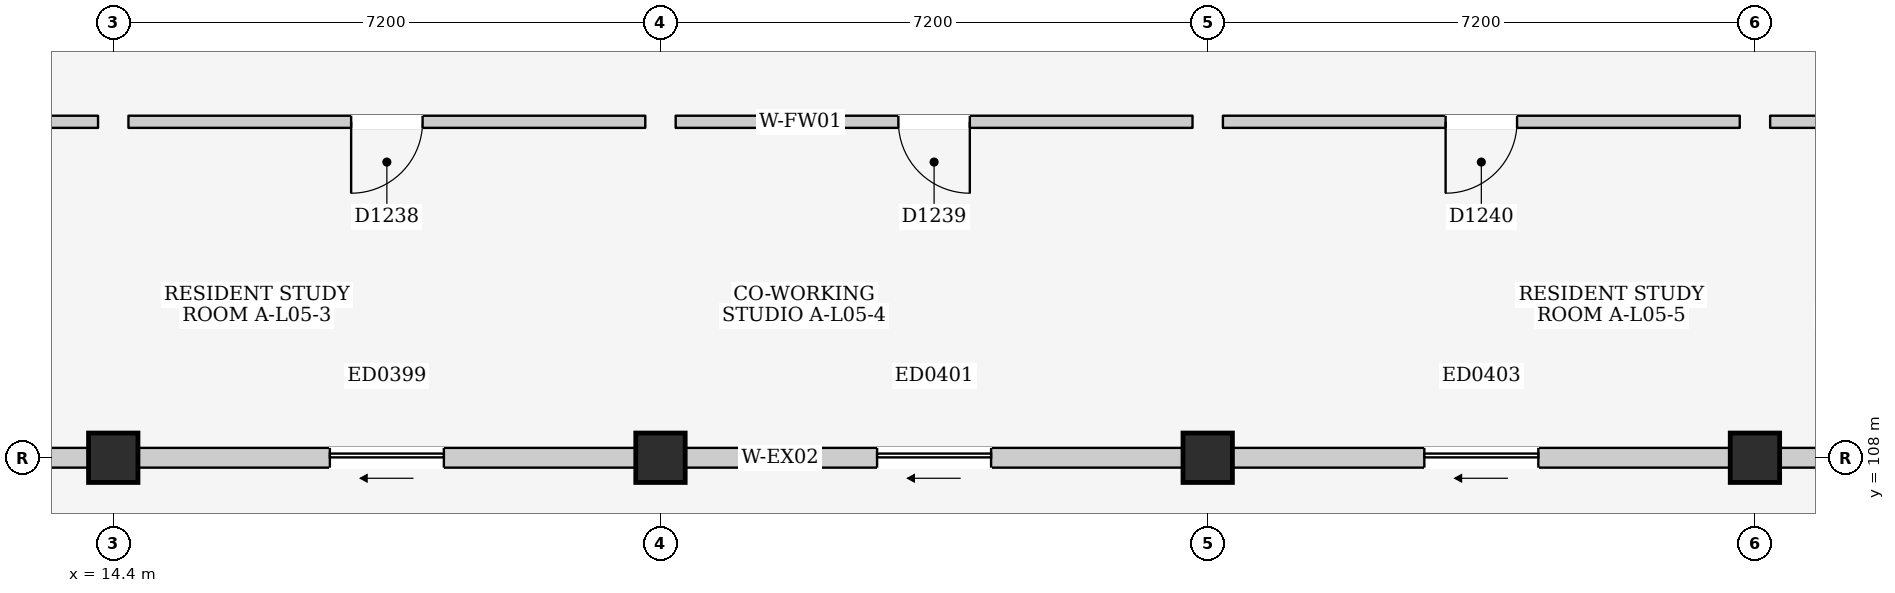
"""IFC4 building model, lengths in metres.
Left out: names, types, materials, properties, quantities, classifications, styles, units other than length and angle.
Written with IfcOpenShell. Run it as: python <this file> out.ifc"""

import sys

from ifc_helpers import new_model, si_unit, direction, frame, frame_2d, origin, origin_2d, place, context, subcontext, project, spatial, rectangle, extrude, element, fill, save


model = new_model("IFC4")
c1 = context("Model", 3, precision=1e-05, world=origin(), true_north=direction((0.0, 1.0)))
c2 = subcontext(c1, "Body", "Model", "MODEL_VIEW")
j1 = project(units=[si_unit("LENGTHUNIT", "METRE"), si_unit("PLANEANGLEUNIT", "RADIAN")], contexts=[c1])
p1 = place(None, origin())
s1 = spatial("IfcSite", under=j1, at=p1, CompositionType="ELEMENT")
p2 = place(p1, origin())
s2 = spatial("IfcBuilding", under=s1, at=p2, CompositionType="ELEMENT")
p3 = place(p2, frame((0.0, 0.0, 18.6)))
s3 = spatial("IfcBuildingStorey", under=s2, at=p3, CompositionType="ELEMENT", Elevation=18.6)
for number, where, z_axis, x_axis in (
    (1, (14.4, 108.0, 0.0), (0.0, 0.0, 1.0), (1.0, 0.0, 0.0)),
    (2, (21.6, 108.0, 0.0), (0.0, 0.0, 1.0), (1.0, 0.0, 0.0)),
    (3, (28.8, 108.0, 0.0), (0.0, 0.0, 1.0), (1.0, 0.0, 0.0)),
    (4, (36.0, 108.0, 0.0), (0.0, 0.0, 1.0), (1.0, 0.0, 0.0)),
):
    element("IfcColumn", number, at=place(p3, frame(where, z_axis=z_axis, x_axis=x_axis)), inside=s3, PredefinedType="COLUMN", context=c2, shape_type="SweptSolid", body=[
        extrude(rectangle(XDim=0.65, YDim=0.65, at=origin_2d()), origin(), (0.0, 0.0, 1.0), 3.3),
    ])
p4 = place(p3, frame((7.525, 108.0, 0.0), z_axis=(0.0, 0.0, 1.0), x_axis=(1.0, 0.0, 0.0)))
e5 = element("IfcWall", 5, at=p4, inside=s3, PredefinedType="ELEMENTEDWALL", context=c2, shape_type="SweptSolid", body=[
    extrude(rectangle(XDim=6.55, YDim=0.26, at=frame_2d((3.275, 0.0))), origin(), (0.0, 0.0, 1.0), 2.395),
])
p5 = place(p4, frame((2.525, 0.0, 0.0)))
e6 = element("IfcOpeningElement", 6, at=p5, cuts=e5, PredefinedType="OPENING", context=c2, shape_type="SweptSolid", body=[
    extrude(rectangle(XDim=1.5, YDim=2.12, at=frame_2d((0.75, 1.06))), frame((0.0, 0.145, 0.0), z_axis=(0.0, -1.0, 0.0), x_axis=(1.0, 0.0, 0.0)), (0.0, 0.0, 1.0), 0.29),
])
p6 = place(p3, frame((14.725, 108.0, 0.0), z_axis=(0.0, 0.0, 1.0), x_axis=(1.0, 0.0, 0.0)))
e7 = element("IfcWall", 7, at=p6, inside=s3, PredefinedType="ELEMENTEDWALL", context=c2, shape_type="SweptSolid", body=[
    extrude(rectangle(XDim=6.55, YDim=0.26, at=frame_2d((3.275, 0.0))), origin(), (0.0, 0.0, 1.0), 2.395),
])
p7 = place(p6, frame((2.525, 0.0, 0.0)))
e8 = element("IfcOpeningElement", 8, at=p7, cuts=e7, PredefinedType="OPENING", context=c2, shape_type="SweptSolid", body=[
    extrude(rectangle(XDim=1.5, YDim=2.12, at=frame_2d((0.75, 1.06))), frame((0.0, 0.145, 0.0), z_axis=(0.0, -1.0, 0.0), x_axis=(1.0, 0.0, 0.0)), (0.0, 0.0, 1.0), 0.29),
])
p8 = place(p3, frame((21.925, 108.0, 0.0), z_axis=(0.0, 0.0, 1.0), x_axis=(1.0, 0.0, 0.0)))
e9 = element("IfcWall", 9, at=p8, inside=s3, PredefinedType="ELEMENTEDWALL", context=c2, shape_type="SweptSolid", body=[
    extrude(rectangle(XDim=6.55, YDim=0.26, at=frame_2d((3.275, 0.0))), origin(), (0.0, 0.0, 1.0), 2.395),
])
p9 = place(p8, frame((2.525, 0.0, 0.0)))
e10 = element("IfcOpeningElement", 10, at=p9, cuts=e9, PredefinedType="OPENING", context=c2, shape_type="SweptSolid", body=[
    extrude(rectangle(XDim=1.5, YDim=2.12, at=frame_2d((0.75, 1.06))), frame((0.0, 0.145, 0.0), z_axis=(0.0, -1.0, 0.0), x_axis=(1.0, 0.0, 0.0)), (0.0, 0.0, 1.0), 0.29),
])
p10 = place(p3, frame((29.125, 108.0, 0.0), z_axis=(0.0, 0.0, 1.0), x_axis=(1.0, 0.0, 0.0)))
e11 = element("IfcWall", 11, at=p10, inside=s3, PredefinedType="ELEMENTEDWALL", context=c2, shape_type="SweptSolid", body=[
    extrude(rectangle(XDim=6.55, YDim=0.26, at=frame_2d((3.275, 0.0))), origin(), (0.0, 0.0, 1.0), 2.395),
])
p11 = place(p10, frame((2.525, 0.0, 0.0)))
e12 = element("IfcOpeningElement", 12, at=p11, cuts=e11, PredefinedType="OPENING", context=c2, shape_type="SweptSolid", body=[
    extrude(rectangle(XDim=1.5, YDim=2.12, at=frame_2d((0.75, 1.06))), frame((0.0, 0.145, 0.0), z_axis=(0.0, -1.0, 0.0), x_axis=(1.0, 0.0, 0.0)), (0.0, 0.0, 1.0), 0.29),
])
p12 = place(p3, frame((36.325, 108.0, 0.0), z_axis=(0.0, 0.0, 1.0), x_axis=(1.0, 0.0, 0.0)))
e13 = element("IfcWall", 13, at=p12, inside=s3, PredefinedType="ELEMENTEDWALL", context=c2, shape_type="SweptSolid", body=[
    extrude(rectangle(XDim=6.55, YDim=0.26, at=frame_2d((3.275, 0.0))), origin(), (0.0, 0.0, 1.0), 2.395),
])
p13 = place(p12, frame((2.525, 0.0, 0.0)))
e14 = element("IfcOpeningElement", 14, at=p13, cuts=e13, PredefinedType="OPENING", context=c2, shape_type="SweptSolid", body=[
    extrude(rectangle(XDim=1.5, YDim=2.12, at=frame_2d((0.75, 1.06))), frame((0.0, 0.145, 0.0), z_axis=(0.0, -1.0, 0.0), x_axis=(1.0, 0.0, 0.0)), (0.0, 0.0, 1.0), 0.29),
])
p14 = place(p3, frame((7.4, 112.42, 0.0), z_axis=(0.0, 0.0, 1.0), x_axis=(1.0, 0.0, 0.0)))
e15 = element("IfcWall", 15, at=p14, inside=s3, PredefinedType="PARTITIONING", context=c2, shape_type="SweptSolid", body=[
    extrude(rectangle(XDim=6.8, YDim=0.16, at=frame_2d((3.4, 0.0))), origin(), (0.0, 0.0, 1.0), 3.06),
])
p15 = place(p14, frame((2.93, 0.0, 0.0)))
e16 = element("IfcOpeningElement", 16, at=p15, cuts=e15, PredefinedType="OPENING", context=c2, shape_type="SweptSolid", body=[
    extrude(rectangle(XDim=0.94, YDim=2.12, at=frame_2d((0.47, 1.06))), frame((0.0, 0.095, 0.0), z_axis=(0.0, -1.0, 0.0), x_axis=(1.0, 0.0, 0.0)), (0.0, 0.0, 1.0), 0.19),
])
p16 = place(p3, frame((14.6, 112.42, 0.0), z_axis=(0.0, 0.0, 1.0), x_axis=(1.0, 0.0, 0.0)))
e17 = element("IfcWall", 17, at=p16, inside=s3, PredefinedType="PARTITIONING", context=c2, shape_type="SweptSolid", body=[
    extrude(rectangle(XDim=6.8, YDim=0.16, at=frame_2d((3.4, 0.0))), origin(), (0.0, 0.0, 1.0), 3.06),
])
p17 = place(p16, frame((2.93, 0.0, 0.0)))
e18 = element("IfcOpeningElement", 18, at=p17, cuts=e17, PredefinedType="OPENING", context=c2, shape_type="SweptSolid", body=[
    extrude(rectangle(XDim=0.94, YDim=2.12, at=frame_2d((0.47, 1.06))), frame((0.0, 0.095, 0.0), z_axis=(0.0, -1.0, 0.0), x_axis=(1.0, 0.0, 0.0)), (0.0, 0.0, 1.0), 0.19),
])
p18 = place(p3, frame((21.8, 112.42, 0.0), z_axis=(0.0, 0.0, 1.0), x_axis=(1.0, 0.0, 0.0)))
e19 = element("IfcWall", 19, at=p18, inside=s3, PredefinedType="PARTITIONING", context=c2, shape_type="SweptSolid", body=[
    extrude(rectangle(XDim=6.8, YDim=0.16, at=frame_2d((3.4, 0.0))), origin(), (0.0, 0.0, 1.0), 3.06),
])
p19 = place(p18, frame((2.93, 0.0, 0.0)))
e20 = element("IfcOpeningElement", 20, at=p19, cuts=e19, PredefinedType="OPENING", context=c2, shape_type="SweptSolid", body=[
    extrude(rectangle(XDim=0.94, YDim=2.12, at=frame_2d((0.47, 1.06))), frame((0.0, 0.095, 0.0), z_axis=(0.0, -1.0, 0.0), x_axis=(1.0, 0.0, 0.0)), (0.0, 0.0, 1.0), 0.19),
])
p20 = place(p3, frame((29.0, 112.42, 0.0), z_axis=(0.0, 0.0, 1.0), x_axis=(1.0, 0.0, 0.0)))
e21 = element("IfcWall", 21, at=p20, inside=s3, PredefinedType="PARTITIONING", context=c2, shape_type="SweptSolid", body=[
    extrude(rectangle(XDim=6.8, YDim=0.16, at=frame_2d((3.4, 0.0))), origin(), (0.0, 0.0, 1.0), 3.06),
])
p21 = place(p20, frame((2.93, 0.0, 0.0)))
e22 = element("IfcOpeningElement", 22, at=p21, cuts=e21, PredefinedType="OPENING", context=c2, shape_type="SweptSolid", body=[
    extrude(rectangle(XDim=0.94, YDim=2.12, at=frame_2d((0.47, 1.06))), frame((0.0, 0.095, 0.0), z_axis=(0.0, -1.0, 0.0), x_axis=(1.0, 0.0, 0.0)), (0.0, 0.0, 1.0), 0.19),
])
p22 = place(p3, frame((36.2, 112.42, 0.0), z_axis=(0.0, 0.0, 1.0), x_axis=(1.0, 0.0, 0.0)))
e23 = element("IfcWall", 23, at=p22, inside=s3, PredefinedType="PARTITIONING", context=c2, shape_type="SweptSolid", body=[
    extrude(rectangle(XDim=6.8, YDim=0.16, at=frame_2d((3.4, 0.0))), origin(), (0.0, 0.0, 1.0), 3.06),
])
p23 = place(p22, frame((2.93, 0.0, 0.0)))
e24 = element("IfcOpeningElement", 24, at=p23, cuts=e23, PredefinedType="OPENING", context=c2, shape_type="SweptSolid", body=[
    extrude(rectangle(XDim=0.94, YDim=2.12, at=frame_2d((0.47, 1.06))), frame((0.0, 0.095, 0.0), z_axis=(0.0, -1.0, 0.0), x_axis=(1.0, 0.0, 0.0)), (0.0, 0.0, 1.0), 0.19),
])
p24 = place(p7, frame((1.5, 0.0, 0.0), z_axis=(0.0, 0.0, 1.0), x_axis=(-1.0, 0.0, 0.0)))
e25 = element("IfcDoor", 25, at=p24, inside=s3, OperationType="SLIDING_TO_LEFT", PredefinedType="DOOR", context=c2, shape_type="SweptSolid", body=[
    extrude(rectangle(XDim=1.5, YDim=2.12, at=frame_2d((0.75, 1.06))), frame((0.0, 0.025, 0.0), z_axis=(0.0, -1.0, 0.0), x_axis=(1.0, 0.0, 0.0)), (0.0, 0.0, 1.0), 0.05),
])
fill(e8, e25)
p25 = place(p9, frame((1.5, 0.0, 0.0), z_axis=(0.0, 0.0, 1.0), x_axis=(-1.0, 0.0, 0.0)))
e26 = element("IfcDoor", 26, at=p25, inside=s3, OperationType="SLIDING_TO_LEFT", PredefinedType="DOOR", context=c2, shape_type="SweptSolid", body=[
    extrude(rectangle(XDim=1.5, YDim=2.12, at=frame_2d((0.75, 1.06))), frame((0.0, 0.025, 0.0), z_axis=(0.0, -1.0, 0.0), x_axis=(1.0, 0.0, 0.0)), (0.0, 0.0, 1.0), 0.05),
])
fill(e10, e26)
p26 = place(p11, frame((1.5, 0.0, 0.0), z_axis=(0.0, 0.0, 1.0), x_axis=(-1.0, 0.0, 0.0)))
e27 = element("IfcDoor", 27, at=p26, inside=s3, OperationType="SLIDING_TO_LEFT", PredefinedType="DOOR", context=c2, shape_type="SweptSolid", body=[
    extrude(rectangle(XDim=1.5, YDim=2.12, at=frame_2d((0.75, 1.06))), frame((0.0, 0.025, 0.0), z_axis=(0.0, -1.0, 0.0), x_axis=(1.0, 0.0, 0.0)), (0.0, 0.0, 1.0), 0.05),
])
fill(e12, e27)
p27 = place(p17, frame((0.94, 0.0, 0.0), z_axis=(0.0, 0.0, 1.0), x_axis=(-1.0, 0.0, 0.0)))
e28 = element("IfcDoor", 28, at=p27, inside=s3, OperationType="SINGLE_SWING_RIGHT", PredefinedType="DOOR", context=c2, shape_type="SweptSolid", body=[
    extrude(rectangle(XDim=0.94, YDim=2.12, at=frame_2d((0.47, 1.06))), frame((0.0, 0.025, 0.0), z_axis=(0.0, -1.0, 0.0), x_axis=(1.0, 0.0, 0.0)), (0.0, 0.0, 1.0), 0.05),
])
fill(e18, e28)
p28 = place(p19, frame((0.94, 0.0, 0.0), z_axis=(0.0, 0.0, 1.0), x_axis=(-1.0, 0.0, 0.0)))
e29 = element("IfcDoor", 29, at=p28, inside=s3, OperationType="SINGLE_SWING_LEFT", PredefinedType="DOOR", context=c2, shape_type="SweptSolid", body=[
    extrude(rectangle(XDim=0.94, YDim=2.12, at=frame_2d((0.47, 1.06))), frame((0.0, 0.025, 0.0), z_axis=(0.0, -1.0, 0.0), x_axis=(1.0, 0.0, 0.0)), (0.0, 0.0, 1.0), 0.05),
])
fill(e20, e29)
p29 = place(p21, frame((0.94, 0.0, 0.0), z_axis=(0.0, 0.0, 1.0), x_axis=(-1.0, 0.0, 0.0)))
e30 = element("IfcDoor", 30, at=p29, inside=s3, OperationType="SINGLE_SWING_RIGHT", PredefinedType="DOOR", context=c2, shape_type="SweptSolid", body=[
    extrude(rectangle(XDim=0.94, YDim=2.12, at=frame_2d((0.47, 1.06))), frame((0.0, 0.025, 0.0), z_axis=(0.0, -1.0, 0.0), x_axis=(1.0, 0.0, 0.0)), (0.0, 0.0, 1.0), 0.05),
])
fill(e22, e30)
save(model, sys.argv[1])
